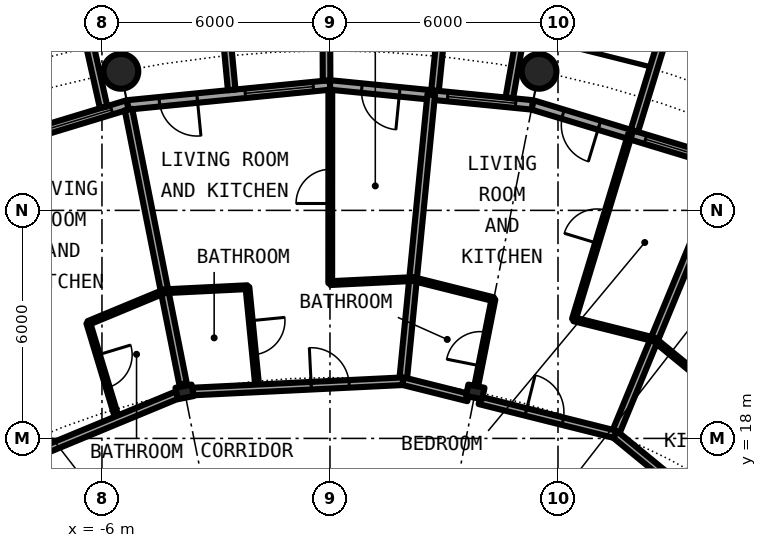
"""IFC4 building model, lengths in metres.
Left out: names, types, materials, properties, quantities, classifications, styles, units other than length and angle.
Written with IfcOpenShell. Run it as: python <this file> out.ifc"""

import sys

from ifc_helpers import new_model, si_unit, direction, frame, frame_2d, origin, origin_2d, place, context, subcontext, project, spatial, rectangle, circle, hollow_circle, i_section, extrude, element, fill, save


model = new_model("IFC4")
c1 = context("Model", 3, precision=1e-05, world=origin(), true_north=direction((0.0, 1.0)))
c2 = subcontext(c1, "Body", "Model", "MODEL_VIEW")
j1 = project(units=[si_unit("LENGTHUNIT", "METRE"), si_unit("PLANEANGLEUNIT", "RADIAN")], contexts=[c1])
p1 = place(None, origin())
s1 = spatial("IfcSite", under=j1, at=p1, CompositionType="ELEMENT")
p2 = place(p1, origin())
s2 = spatial("IfcBuilding", under=s1, at=p2, CompositionType="ELEMENT")
p3 = place(p2, frame((0.0, 0.0, 111.65)))
s3 = spatial("IfcBuildingStorey", under=s2, at=p3, CompositionType="ELEMENT", Elevation=111.65)
for number, where, z_axis, x_axis in (
    (1, (5.501, 27.658, 0.0), (0.0, 0.0, 1.0), (1.0, 0.0, 0.0)),
    (2, (-5.501, 27.658, 0.0), (0.0, 0.0, 1.0), (1.0, 0.0, 0.0)),
):
    element("IfcColumn", number, at=place(p3, frame(where, z_axis=z_axis, x_axis=x_axis)), inside=s3, PredefinedType="COLUMN", context=c2, shape_type="SweptSolid", body=[
        extrude(hollow_circle(Radius=0.457, WallThickness=0.04, at=origin_2d()), origin(), (0.0, 0.0, 1.0), 3.05),
    ])
for number, where, z_axis, x_axis in (
    (3, (3.824, 19.223, 0.0), (0.0, 0.0, 1.0), (0.195, 0.981, 0.0)),
    (4, (-3.824, 19.223, 0.0), (0.0, 0.0, 1.0), (-0.195, 0.981, 0.0)),
):
    element("IfcColumn", number, at=place(p3, frame(where, z_axis=z_axis, x_axis=x_axis)), inside=s3, PredefinedType="COLUMN", context=c2, shape_type="SweptSolid", body=[
        extrude(i_section(OverallWidth=0.307, OverallDepth=0.432, WebThickness=0.021, FlangeThickness=0.04, FilletRadius=0.027, at=origin_2d()), origin(), (0.0, 0.0, 1.0), 3.05),
    ])
p4 = place(p3, frame((10.447, 25.222, 0.0), z_axis=(0.0, 0.0, 1.0), x_axis=(-0.956965678721, 0.290201119486, 0.0)))
e5 = element("IfcWall", 5, at=p4, inside=s3, PredefinedType="SOLIDWALL", context=c2, shape_type="SweptSolid", body=[
    extrude(rectangle(XDim=5.351, YDim=0.25, at=frame_2d((2.676, 0.0))), origin(), (0.0, 0.0, 1.0), 2.7),
])
p5 = place(p4, frame((0.441, 0.0, 0.3)))
e6 = element("IfcOpeningElement", 6, at=p5, cuts=e5, PredefinedType="OPENING", context=c2, shape_type="SweptSolid", body=[
    extrude(rectangle(XDim=1.8, YDim=2.1, at=frame_2d((0.9, 1.05))), frame((0.0, 0.135, 0.0), z_axis=(0.0, -1.0, 0.0), x_axis=(1.0, 0.0, 0.0)), (0.0, 0.0, 1.0), 0.27),
])
p6 = place(p4, frame((3.51, 0.0, 0.0)))
e7 = element("IfcOpeningElement", 7, at=p6, cuts=e5, PredefinedType="OPENING", context=c2, shape_type="SweptSolid", body=[
    extrude(rectangle(XDim=1.0, YDim=2.2, at=frame_2d((0.5, 1.1))), frame((0.0, 0.135, 0.0), z_axis=(0.0, -1.0, 0.0), x_axis=(1.0, 0.0, 0.0)), (0.0, 0.0, 1.0), 0.27),
])
p7 = place(p3, frame((11.638, 28.084, -0.03), z_axis=(0.0, 0.0, 1.0), x_axis=(-0.941461077774, 0.337121697664, 0.0)))
e8 = element("IfcWall", 8, at=p7, inside=s3, PredefinedType="SOLIDWALL", context=c2, shape_type="SweptSolid", body=[
    extrude(rectangle(XDim=2.993, YDim=0.2, at=frame_2d((1.497, 0.0))), origin(), (0.0, 0.0, 1.0), 2.73),
])
p8 = place(p7, frame((0.457, 0.0, 0.33)))
e9 = element("IfcOpeningElement", 9, at=p8, cuts=e8, PredefinedType="OPENING", context=c2, shape_type="SweptSolid", body=[
    extrude(circle(Radius=1.04, at=frame_2d((1.04, 1.04))), frame((0.0, 0.11, 0.0), z_axis=(0.0, -1.0, 0.0), x_axis=(1.0, 0.0, 0.0)), (0.0, 0.0, 1.0), 0.22),
])
p9 = place(p3, frame((8.009, 26.092, -0.03), z_axis=(0.0, 0.0, 1.0), x_axis=(0.293406695073, 0.955987715029, 0.0)))
e10 = element("IfcWall", 10, at=p9, inside=s3, PredefinedType="SOLIDWALL", context=c2, shape_type="SweptSolid", body=[
    extrude(rectangle(XDim=3.006, YDim=0.2, at=frame_2d((1.503, 0.0))), origin(), (0.0, 0.0, 1.0), 2.73),
])
p10 = place(p3, frame((5.326, 26.775, 0.0), z_axis=(0.0, 0.0, 1.0), x_axis=(-0.995173996315, 0.098126026407, 0.0)))
e11 = element("IfcWall", 11, at=p10, inside=s3, PredefinedType="SOLIDWALL", context=c2, shape_type="SweptSolid", body=[
    extrude(rectangle(XDim=5.352, YDim=0.25, at=frame_2d((2.676, 0.0))), origin(), (0.0, 0.0, 1.0), 2.7),
])
p11 = place(p10, frame((0.441, 0.0, 0.3)))
e12 = element("IfcOpeningElement", 12, at=p11, cuts=e11, PredefinedType="OPENING", context=c2, shape_type="SweptSolid", body=[
    extrude(rectangle(XDim=1.8, YDim=2.1, at=frame_2d((0.9, 1.05))), frame((0.0, 0.135, 0.0), z_axis=(0.0, -1.0, 0.0), x_axis=(1.0, 0.0, 0.0)), (0.0, 0.0, 1.0), 0.27),
])
p12 = place(p10, frame((3.51, 0.0, 0.0)))
e13 = element("IfcOpeningElement", 13, at=p12, cuts=e11, PredefinedType="OPENING", context=c2, shape_type="SweptSolid", body=[
    extrude(rectangle(XDim=1.0, YDim=2.2, at=frame_2d((0.5, 1.1))), frame((0.0, 0.135, 0.0), z_axis=(0.0, -1.0, 0.0), x_axis=(1.0, 0.0, 0.0)), (0.0, 0.0, 1.0), 0.27),
])
p13 = place(p3, frame((4.72, 26.961, -0.03), z_axis=(0.0, 0.0, 1.0), x_axis=(0.172463232037, 0.98501595601, 0.0)))
e14 = element("IfcWall", 14, at=p13, inside=s3, PredefinedType="SOLIDWALL", context=c2, shape_type="SweptSolid", body=[
    extrude(rectangle(XDim=2.929, YDim=0.2, at=frame_2d((1.464, 0.0))), origin(), (0.0, 0.0, 1.0), 2.73),
])
p14 = place(p3, frame((2.764, 27.153, -0.03), z_axis=(0.0, 0.0, 1.0), x_axis=(0.101505487237, 0.994834979311, 0.0)))
e15 = element("IfcWall", 15, at=p14, inside=s3, PredefinedType="SOLIDWALL", context=c2, shape_type="SweptSolid", body=[
    extrude(rectangle(XDim=3.007, YDim=0.2, at=frame_2d((1.503, 0.0))), origin(), (0.0, 0.0, 1.0), 2.73),
])
p15 = place(p3, frame((0.0, 27.3, 0.0), z_axis=(0.0, 0.0, 1.0), x_axis=(-0.995173996315, -0.098126026407, 0.0)))
e16 = element("IfcWall", 16, at=p15, inside=s3, PredefinedType="SOLIDWALL", context=c2, shape_type="SweptSolid", body=[
    extrude(rectangle(XDim=5.352, YDim=0.25, at=frame_2d((2.676, 0.0))), origin(), (0.0, 0.0, 1.0), 2.7),
])
p16 = place(p15, frame((0.441, 0.0, 0.3)))
e17 = element("IfcOpeningElement", 17, at=p16, cuts=e16, PredefinedType="OPENING", context=c2, shape_type="SweptSolid", body=[
    extrude(rectangle(XDim=1.8, YDim=2.1, at=frame_2d((0.9, 1.05))), frame((0.0, 0.135, 0.0), z_axis=(0.0, -1.0, 0.0), x_axis=(1.0, 0.0, 0.0)), (0.0, 0.0, 1.0), 0.27),
])
p17 = place(p15, frame((3.51, 0.0, 0.0)))
e18 = element("IfcOpeningElement", 18, at=p17, cuts=e16, PredefinedType="OPENING", context=c2, shape_type="SweptSolid", body=[
    extrude(rectangle(XDim=1.0, YDim=2.2, at=frame_2d((0.5, 1.1))), frame((0.0, 0.135, 0.0), z_axis=(0.0, -1.0, 0.0), x_axis=(1.0, 0.0, 0.0)), (0.0, 0.0, 1.0), 0.27),
])
p18 = place(p3, frame((-0.09, 27.417, -0.03), z_axis=(0.0, 0.0, 1.0), x_axis=(-0.00347308367, 0.999993968827, 0.0)))
e19 = element("IfcWall", 19, at=p18, inside=s3, PredefinedType="SOLIDWALL", context=c2, shape_type="SweptSolid", body=[
    extrude(rectangle(XDim=2.882, YDim=0.2, at=frame_2d((1.441, 0.0))), origin(), (0.0, 0.0, 1.0), 2.73),
])
p19 = place(p3, frame((-2.586, 27.171, -0.03), z_axis=(0.0, 0.0, 1.0), x_axis=(-0.094548432284, 0.995520262954, 0.0)))
e20 = element("IfcWall", 20, at=p19, inside=s3, PredefinedType="SOLIDWALL", context=c2, shape_type="SweptSolid", body=[
    extrude(rectangle(XDim=3.006, YDim=0.2, at=frame_2d((1.503, 0.0))), origin(), (0.0, 0.0, 1.0), 2.73),
])
p20 = place(p3, frame((-5.326, 26.775, 0.0), z_axis=(0.0, 0.0, 1.0), x_axis=(-0.956965678721, -0.290201119486, 0.0)))
e21 = element("IfcWall", 21, at=p20, inside=s3, PredefinedType="SOLIDWALL", context=c2, shape_type="SweptSolid", body=[
    extrude(rectangle(XDim=5.351, YDim=0.25, at=frame_2d((2.676, 0.0))), origin(), (0.0, 0.0, 1.0), 2.7),
])
p21 = place(p20, frame((0.441, 0.0, 0.3)))
e22 = element("IfcOpeningElement", 22, at=p21, cuts=e21, PredefinedType="OPENING", context=c2, shape_type="SweptSolid", body=[
    extrude(rectangle(XDim=1.8, YDim=2.1, at=frame_2d((0.9, 1.05))), frame((0.0, 0.135, 0.0), z_axis=(0.0, -1.0, 0.0), x_axis=(1.0, 0.0, 0.0)), (0.0, 0.0, 1.0), 0.27),
])
p22 = place(p20, frame((3.51, 0.0, 0.0)))
e23 = element("IfcOpeningElement", 23, at=p22, cuts=e21, PredefinedType="OPENING", context=c2, shape_type="SweptSolid", body=[
    extrude(rectangle(XDim=1.0, YDim=2.2, at=frame_2d((0.5, 1.1))), frame((0.0, 0.135, 0.0), z_axis=(0.0, -1.0, 0.0), x_axis=(1.0, 0.0, 0.0)), (0.0, 0.0, 1.0), 0.27),
])
p23 = place(p3, frame((-5.957, 26.715, -0.03), z_axis=(0.0, 0.0, 1.0), x_axis=(-0.217857287091, 0.975980636315, 0.0)))
e24 = element("IfcWall", 24, at=p23, inside=s3, PredefinedType="SOLIDWALL", context=c2, shape_type="SweptSolid", body=[
    extrude(rectangle(XDim=2.928, YDim=0.2, at=frame_2d((1.464, 0.0))), origin(), (0.0, 0.0, 1.0), 2.73),
])
p24 = place(p3, frame((-6.36, 21.039, 0.0), z_axis=(0.0, 0.0, 1.0), x_axis=(0.289375816213, -0.957215564537, 0.0)))
e25 = element("IfcWall", 25, at=p24, inside=s3, PredefinedType="PARTITIONING", context=c2, shape_type="SweptSolid", body=[
    extrude(rectangle(XDim=2.661, YDim=0.1, at=frame_2d((1.331, 0.0))), origin(), (0.0, 0.0, 1.0), 2.7),
])
p25 = place(p24, frame((0.88, 0.0, 0.0)))
e26 = element("IfcOpeningElement", 26, at=p25, cuts=e25, PredefinedType="OPENING", context=c2, shape_type="SweptSolid", body=[
    extrude(rectangle(XDim=0.9, YDim=2.3, at=frame_2d((0.45, 1.15))), frame((0.0, 0.06, 0.0), z_axis=(0.0, -1.0, 0.0), x_axis=(1.0, 0.0, 0.0)), (0.0, 0.0, 1.0), 0.12),
])
p26 = place(p3, frame((-5.302, 26.653, 0.0), z_axis=(0.0, 0.0, 1.0), x_axis=(0.195127206499, -0.980777942902, 0.0)))
e27 = element("IfcWall", 27, at=p26, inside=s3, PredefinedType="PARTITIONING", context=c2, shape_type="SweptSolid", body=[
    extrude(rectangle(XDim=7.359, YDim=0.2, at=frame_2d((3.68, 0.0))), origin(), (0.0, 0.0, 1.0), 2.7),
])
p27 = place(p3, frame((-2.172, 21.979, 0.0), z_axis=(0.0, 0.0, 1.0), x_axis=(0.098383180323, -0.995148606907, 0.0)))
e28 = element("IfcWall", 28, at=p27, inside=s3, PredefinedType="PARTITIONING", context=c2, shape_type="SweptSolid", body=[
    extrude(rectangle(XDim=2.675, YDim=0.1, at=frame_2d((1.337, 0.0))), origin(), (0.0, 0.0, 1.0), 2.7),
])
p28 = place(p27, frame((0.887, 0.0, 0.0)))
e29 = element("IfcOpeningElement", 29, at=p28, cuts=e28, PredefinedType="OPENING", context=c2, shape_type="SweptSolid", body=[
    extrude(rectangle(XDim=0.9, YDim=2.3, at=frame_2d((0.45, 1.15))), frame((0.0, 0.06, 0.0), z_axis=(0.0, -1.0, 0.0), x_axis=(1.0, 0.0, 0.0)), (0.0, 0.0, 1.0), 0.12),
])
p29 = place(p3, frame((0.007, 22.086, 0.0), z_axis=(0.0, 0.0, 1.0), x_axis=(0.000383785052, 0.999999926355, 0.0)))
e30 = element("IfcWall", 30, at=p29, inside=s3, PredefinedType="PARTITIONING", context=c2, shape_type="SweptSolid", body=[
    extrude(rectangle(XDim=5.089, YDim=0.1, at=frame_2d((2.544, 0.0))), origin(), (0.0, 0.0, 1.0), 2.7),
])
p30 = place(p29, frame((2.095, 0.0, 0.0)))
e31 = element("IfcOpeningElement", 31, at=p30, cuts=e30, PredefinedType="OPENING", context=c2, shape_type="SweptSolid", body=[
    extrude(rectangle(XDim=0.9, YDim=2.3, at=frame_2d((0.45, 1.15))), frame((0.0, 0.06, 0.0), z_axis=(0.0, -1.0, 0.0), x_axis=(1.0, 0.0, 0.0)), (0.0, 0.0, 1.0), 0.12),
])
p31 = place(p3, frame((1.921, 19.506, 0.0), z_axis=(0.0, 0.0, 1.0), x_axis=(0.098115395479, 0.995175044487, 0.0)))
e32 = element("IfcWall", 32, at=p31, inside=s3, PredefinedType="PARTITIONING", context=c2, shape_type="SweptSolid", body=[
    extrude(rectangle(XDim=7.574, YDim=0.2, at=frame_2d((3.787, 0.0))), origin(), (0.0, 0.0, 1.0), 2.7),
])
p32 = place(p3, frame((3.86, 19.436, 0.0), z_axis=(0.0, 0.0, 1.0), x_axis=(0.194627049372, 0.98087731733, 0.0)))
e33 = element("IfcWall", 33, at=p32, inside=s3, PredefinedType="PARTITIONING", context=c2, shape_type="SweptSolid", body=[
    extrude(rectangle(XDim=2.271, YDim=0.1, at=frame_2d((1.135, 0.0))), origin(), (0.0, 0.0, 1.0), 2.7),
])
p33 = place(p32, frame((0.483, 0.0, 0.0)))
e34 = element("IfcOpeningElement", 34, at=p33, cuts=e33, PredefinedType="OPENING", context=c2, shape_type="SweptSolid", body=[
    extrude(rectangle(XDim=0.9, YDim=2.3, at=frame_2d((0.45, 1.15))), frame((0.0, 0.06, 0.0), z_axis=(0.0, -1.0, 0.0), x_axis=(1.0, 0.0, 0.0)), (0.0, 0.0, 1.0), 0.12),
])
p34 = place(p3, frame((6.418, 21.133, 0.0), z_axis=(0.0, 0.0, 1.0), x_axis=(0.290651827018, 0.956828885147, 0.0)))
e35 = element("IfcWall", 35, at=p34, inside=s3, PredefinedType="PARTITIONING", context=c2, shape_type="SweptSolid", body=[
    extrude(rectangle(XDim=5.089, YDim=0.1, at=frame_2d((2.544, 0.0))), origin(), (0.0, 0.0, 1.0), 2.7),
])
p35 = place(p34, frame((2.094, 0.0, 0.0)))
e36 = element("IfcOpeningElement", 36, at=p35, cuts=e35, PredefinedType="OPENING", context=c2, shape_type="SweptSolid", body=[
    extrude(rectangle(XDim=0.9, YDim=2.3, at=frame_2d((0.45, 1.15))), frame((0.0, 0.06, 0.0), z_axis=(0.0, -1.0, 0.0), x_axis=(1.0, 0.0, 0.0)), (0.0, 0.0, 1.0), 0.12),
])
p36 = place(p3, frame((7.501, 18.108, 0.0), z_axis=(0.0, 0.0, 1.0), x_axis=(0.382490346157, 0.923959487801, 0.0)))
e37 = element("IfcWall", 37, at=p36, inside=s3, PredefinedType="PARTITIONING", context=c2, shape_type="SweptSolid", body=[
    extrude(rectangle(XDim=7.574, YDim=0.2, at=frame_2d((3.787, 0.0))), origin(), (0.0, 0.0, 1.0), 2.7),
])
p37 = place(p3, frame((7.5, 18.108, 0.0), z_axis=(0.0, 0.0, 1.0), x_axis=(0.773049018445, -0.634346289562, 0.0)))
e38 = element("IfcWall", 38, at=p37, inside=s3, PredefinedType="PARTITIONING", context=c2, shape_type="SweptSolid", body=[
    extrude(rectangle(XDim=11.219, YDim=0.2, at=frame_2d((5.61, 0.0))), origin(), (0.0, 0.0, 1.0), 2.39),
])
p38 = place(p37, frame((7.085, 0.0, 0.0)))
e39 = element("IfcOpeningElement", 39, at=p38, cuts=e38, PredefinedType="OPENING", context=c2, shape_type="SweptSolid", body=[
    extrude(rectangle(XDim=1.0, YDim=2.3, at=frame_2d((0.5, 1.15))), frame((0.0, 0.11, 0.0), z_axis=(0.0, -1.0, 0.0), x_axis=(1.0, 0.0, 0.0)), (0.0, 0.0, 1.0), 0.22),
])
p39 = place(p3, frame((-10.745, 16.357, 0.0), z_axis=(0.0, 0.0, 1.0), x_axis=(0.923928411035, 0.382565407848, 0.0)))
e40 = element("IfcWall", 40, at=p39, inside=s3, PredefinedType="PARTITIONING", context=c2, shape_type="SweptSolid", body=[
    extrude(rectangle(XDim=7.335, YDim=0.2, at=frame_2d((3.667, 0.0))), origin(), (0.0, 0.0, 1.0), 2.39),
])
p40 = place(p39, frame((2.212, 0.0, 0.0)))
e41 = element("IfcOpeningElement", 41, at=p40, cuts=e40, PredefinedType="OPENING", context=c2, shape_type="SweptSolid", body=[
    extrude(rectangle(XDim=1.0, YDim=2.3, at=frame_2d((0.5, 1.15))), frame((0.0, 0.11, 0.0), z_axis=(0.0, -1.0, 0.0), x_axis=(1.0, 0.0, 0.0)), (0.0, 0.0, 1.0), 0.22),
])
p41 = place(p3, frame((-3.669, 19.231, 0.0), z_axis=(0.0, 0.0, 1.0), x_axis=(0.998803644396, 0.048900715146, 0.0)))
e42 = element("IfcWall", 42, at=p41, inside=s3, PredefinedType="PARTITIONING", context=c2, shape_type="SweptSolid", body=[
    extrude(rectangle(XDim=5.602, YDim=0.2, at=frame_2d((2.801, 0.0))), origin(), (0.0, 0.0, 1.0), 2.39),
])
p42 = place(p41, frame((3.179, 0.0, 0.0)))
e43 = element("IfcOpeningElement", 43, at=p42, cuts=e42, PredefinedType="OPENING", context=c2, shape_type="SweptSolid", body=[
    extrude(rectangle(XDim=1.0, YDim=2.3, at=frame_2d((0.5, 1.15))), frame((0.0, 0.11, 0.0), z_axis=(0.0, -1.0, 0.0), x_axis=(1.0, 0.0, 0.0)), (0.0, 0.0, 1.0), 0.22),
])
p43 = place(p3, frame((1.921, 19.506, 0.0), z_axis=(0.0, 0.0, 1.0), x_axis=(0.97002068022, -0.243022385689, 0.0)))
e44 = element("IfcWall", 44, at=p43, inside=s3, PredefinedType="PARTITIONING", context=c2, shape_type="SweptSolid", body=[
    extrude(rectangle(XDim=1.77, YDim=0.2, at=frame_2d((0.885, 0.0))), origin(), (0.0, 0.0, 1.0), 2.39),
])
p44 = place(p3, frame((3.936, 19.001, 0.0), z_axis=(0.0, 0.0, 1.0), x_axis=(0.970025155677, -0.243004521262, 0.0)))
e45 = element("IfcWall", 45, at=p44, inside=s3, PredefinedType="PARTITIONING", context=c2, shape_type="SweptSolid", body=[
    extrude(rectangle(XDim=3.675, YDim=0.2, at=frame_2d((1.837, 0.0))), origin(), (0.0, 0.0, 1.0), 2.39),
])
p45 = place(p44, frame((1.258, 0.0, 0.0)))
e46 = element("IfcOpeningElement", 46, at=p45, cuts=e45, PredefinedType="OPENING", context=c2, shape_type="SweptSolid", body=[
    extrude(rectangle(XDim=1.0, YDim=2.3, at=frame_2d((0.5, 1.15))), frame((0.0, 0.11, 0.0), z_axis=(0.0, -1.0, 0.0), x_axis=(1.0, 0.0, 0.0)), (0.0, 0.0, 1.0), 0.22),
])
p46 = place(p3, frame((8.534, 20.603, 0.0), z_axis=(0.0, 0.0, 1.0), x_axis=(0.773000340237, -0.634405606843, 0.0)))
e47 = element("IfcWall", 47, at=p46, inside=s3, PredefinedType="PARTITIONING", context=c2, shape_type="SweptSolid", body=[
    extrude(rectangle(XDim=6.474, YDim=0.1, at=frame_2d((3.237, 0.0))), origin(), (0.0, 0.0, 1.0), 2.7),
])
p47 = place(p3, frame((-6.36, 21.039, 0.0), z_axis=(0.0, 0.0, 1.0), x_axis=(0.923743082263, 0.383012686436, 0.0)))
e48 = element("IfcWall", 48, at=p47, inside=s3, PredefinedType="PARTITIONING", context=c2, shape_type="SweptSolid", body=[
    extrude(rectangle(XDim=2.175, YDim=0.1, at=frame_2d((1.087, 0.0))), origin(), (0.0, 0.0, 1.0), 2.7),
])
for number, where, z_axis, x_axis in (
    (49, (-4.351, 21.872, 0.0), (0.0, 0.0, 1.0), (0.999, 0.049, 0.0)),
    (50, (0.007, 22.086, 0.0), (0.0, 0.0, 1.0), (0.999, 0.049, 0.0)),
):
    element("IfcWall", number, at=place(p3, frame(where, z_axis=z_axis, x_axis=x_axis)), inside=s3, PredefinedType="PARTITIONING", context=c2, shape_type="SweptSolid", body=[
        extrude(rectangle(XDim=2.182, YDim=0.1, at=frame_2d((1.091, 0.0))), origin(), (0.0, 0.0, 1.0), 2.7),
    ])
for number, where, z_axis, x_axis in (
    (51, (2.186, 22.193, 0.0), (0.0, 0.0, 1.0), (0.97, -0.243, 0.0)),
    (52, (6.418, 21.133, 0.0), (0.0, 0.0, 1.0), (0.97, -0.243, 0.0)),
):
    element("IfcWall", number, at=place(p3, frame(where, z_axis=z_axis, x_axis=x_axis)), inside=s3, PredefinedType="PARTITIONING", context=c2, shape_type="SweptSolid", body=[
        extrude(rectangle(XDim=2.181, YDim=0.1, at=frame_2d((1.091, 0.0))), origin(), (0.0, 0.0, 1.0), 2.7),
    ])
p48 = place(p5, origin())
e53 = element("IfcWindow", 53, at=p48, inside=s3, PartitioningType="SINGLE_PANEL", PredefinedType="WINDOW", context=c2, shape_type="SweptSolid", body=[
    extrude(rectangle(XDim=1.8, YDim=2.1, at=frame_2d((0.9, 1.05))), frame((0.0, 0.03, 0.0), z_axis=(0.0, -1.0, 0.0), x_axis=(1.0, 0.0, 0.0)), (0.0, 0.0, 1.0), 0.06),
])
fill(e6, e53)
p49 = place(p6, origin())
e54 = element("IfcDoor", 54, at=p49, inside=s3, OperationType="SINGLE_SWING_LEFT", PredefinedType="DOOR", context=c2, shape_type="SweptSolid", body=[
    extrude(rectangle(XDim=1.0, YDim=2.2, at=frame_2d((0.5, 1.1))), frame((0.0, 0.025, 0.0), z_axis=(0.0, -1.0, 0.0), x_axis=(1.0, 0.0, 0.0)), (0.0, 0.0, 1.0), 0.05),
])
fill(e7, e54)
p50 = place(p11, origin())
e55 = element("IfcWindow", 55, at=p50, inside=s3, PartitioningType="SINGLE_PANEL", PredefinedType="WINDOW", context=c2, shape_type="SweptSolid", body=[
    extrude(rectangle(XDim=1.8, YDim=2.1, at=frame_2d((0.9, 1.05))), frame((0.0, 0.03, 0.0), z_axis=(0.0, -1.0, 0.0), x_axis=(1.0, 0.0, 0.0)), (0.0, 0.0, 1.0), 0.06),
])
fill(e12, e55)
p51 = place(p12, origin())
e56 = element("IfcDoor", 56, at=p51, inside=s3, OperationType="SINGLE_SWING_LEFT", PredefinedType="DOOR", context=c2, shape_type="SweptSolid", body=[
    extrude(rectangle(XDim=1.0, YDim=2.2, at=frame_2d((0.5, 1.1))), frame((0.0, 0.025, 0.0), z_axis=(0.0, -1.0, 0.0), x_axis=(1.0, 0.0, 0.0)), (0.0, 0.0, 1.0), 0.05),
])
fill(e13, e56)
p52 = place(p16, origin())
e57 = element("IfcWindow", 57, at=p52, inside=s3, PartitioningType="SINGLE_PANEL", PredefinedType="WINDOW", context=c2, shape_type="SweptSolid", body=[
    extrude(rectangle(XDim=1.8, YDim=2.1, at=frame_2d((0.9, 1.05))), frame((0.0, 0.03, 0.0), z_axis=(0.0, -1.0, 0.0), x_axis=(1.0, 0.0, 0.0)), (0.0, 0.0, 1.0), 0.06),
])
fill(e17, e57)
p53 = place(p17, origin())
e58 = element("IfcDoor", 58, at=p53, inside=s3, OperationType="SINGLE_SWING_LEFT", PredefinedType="DOOR", context=c2, shape_type="SweptSolid", body=[
    extrude(rectangle(XDim=1.0, YDim=2.2, at=frame_2d((0.5, 1.1))), frame((0.0, 0.025, 0.0), z_axis=(0.0, -1.0, 0.0), x_axis=(1.0, 0.0, 0.0)), (0.0, 0.0, 1.0), 0.05),
])
fill(e18, e58)
p54 = place(p21, origin())
e59 = element("IfcWindow", 59, at=p54, inside=s3, PartitioningType="SINGLE_PANEL", PredefinedType="WINDOW", context=c2, shape_type="SweptSolid", body=[
    extrude(rectangle(XDim=1.8, YDim=2.1, at=frame_2d((0.9, 1.05))), frame((0.0, 0.03, 0.0), z_axis=(0.0, -1.0, 0.0), x_axis=(1.0, 0.0, 0.0)), (0.0, 0.0, 1.0), 0.06),
])
fill(e22, e59)
p55 = place(p45, origin())
e60 = element("IfcDoor", 60, at=p55, inside=s3, OperationType="SINGLE_SWING_LEFT", PredefinedType="DOOR", context=c2, shape_type="SweptSolid", body=[
    extrude(rectangle(XDim=1.0, YDim=2.3, at=frame_2d((0.5, 1.15))), frame((0.0, 0.025, 0.0), z_axis=(0.0, -1.0, 0.0), x_axis=(1.0, 0.0, 0.0)), (0.0, 0.0, 1.0), 0.05),
])
fill(e46, e60)
p56 = place(p33, origin())
e61 = element("IfcDoor", 61, at=p56, inside=s3, OperationType="SINGLE_SWING_LEFT", PredefinedType="DOOR", context=c2, shape_type="SweptSolid", body=[
    extrude(rectangle(XDim=0.9, YDim=2.3, at=frame_2d((0.45, 1.15))), frame((0.0, 0.025, 0.0), z_axis=(0.0, -1.0, 0.0), x_axis=(1.0, 0.0, 0.0)), (0.0, 0.0, 1.0), 0.05),
])
fill(e34, e61)
p57 = place(p35, origin())
e62 = element("IfcDoor", 62, at=p57, inside=s3, OperationType="SINGLE_SWING_LEFT", PredefinedType="DOOR", context=c2, shape_type="SweptSolid", body=[
    extrude(rectangle(XDim=0.9, YDim=2.3, at=frame_2d((0.45, 1.15))), frame((0.0, 0.025, 0.0), z_axis=(0.0, -1.0, 0.0), x_axis=(1.0, 0.0, 0.0)), (0.0, 0.0, 1.0), 0.05),
])
fill(e36, e62)
p58 = place(p42, origin())
e63 = element("IfcDoor", 63, at=p58, inside=s3, OperationType="SINGLE_SWING_RIGHT", PredefinedType="DOOR", context=c2, shape_type="SweptSolid", body=[
    extrude(rectangle(XDim=1.0, YDim=2.3, at=frame_2d((0.5, 1.15))), frame((0.0, 0.025, 0.0), z_axis=(0.0, -1.0, 0.0), x_axis=(1.0, 0.0, 0.0)), (0.0, 0.0, 1.0), 0.05),
])
fill(e43, e63)
p59 = place(p28, origin())
e64 = element("IfcDoor", 64, at=p59, inside=s3, OperationType="SINGLE_SWING_RIGHT", PredefinedType="DOOR", context=c2, shape_type="SweptSolid", body=[
    extrude(rectangle(XDim=0.9, YDim=2.3, at=frame_2d((0.45, 1.15))), frame((0.0, 0.025, 0.0), z_axis=(0.0, -1.0, 0.0), x_axis=(1.0, 0.0, 0.0)), (0.0, 0.0, 1.0), 0.05),
])
fill(e29, e64)
p60 = place(p30, origin())
e65 = element("IfcDoor", 65, at=p60, inside=s3, OperationType="SINGLE_SWING_RIGHT", PredefinedType="DOOR", context=c2, shape_type="SweptSolid", body=[
    extrude(rectangle(XDim=0.9, YDim=2.3, at=frame_2d((0.45, 1.15))), frame((0.0, 0.025, 0.0), z_axis=(0.0, -1.0, 0.0), x_axis=(1.0, 0.0, 0.0)), (0.0, 0.0, 1.0), 0.05),
])
fill(e31, e65)
p61 = place(p25, origin())
e66 = element("IfcDoor", 66, at=p61, inside=s3, OperationType="SINGLE_SWING_LEFT", PredefinedType="DOOR", context=c2, shape_type="SweptSolid", body=[
    extrude(rectangle(XDim=0.9, YDim=2.3, at=frame_2d((0.45, 1.15))), frame((0.0, 0.025, 0.0), z_axis=(0.0, -1.0, 0.0), x_axis=(1.0, 0.0, 0.0)), (0.0, 0.0, 1.0), 0.05),
])
fill(e26, e66)
save(model, sys.argv[1])
